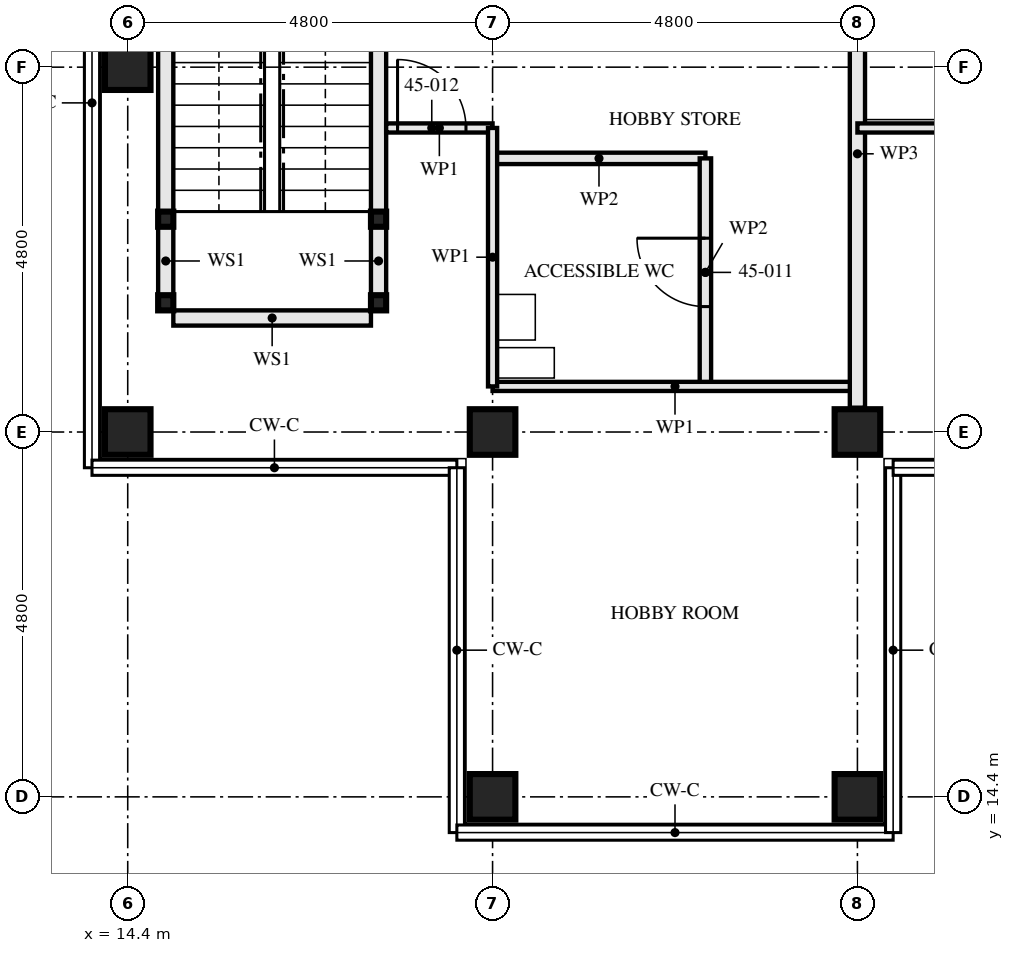
"""IFC4 building model, lengths in metres.
Left out: names, types, materials, properties, quantities, classifications, styles, units other than length and angle.
Written with IfcOpenShell. Run it as: python <this file> out.ifc"""

import sys

from ifc_helpers import new_model, si_unit, direction, frame, frame_2d, origin, origin_2d, place, context, subcontext, project, spatial, rectangle, hollow_rectangle, extrude, element, fill, save


model = new_model("IFC4")
c1 = context("Model", 3, precision=1e-05, world=origin(), true_north=direction((0.0, 1.0)))
c2 = subcontext(c1, "Body", "Model", "MODEL_VIEW")
j1 = project(units=[si_unit("LENGTHUNIT", "METRE"), si_unit("PLANEANGLEUNIT", "RADIAN")], contexts=[c1])
p1 = place(None, origin())
s1 = spatial("IfcSite", under=j1, at=p1, CompositionType="ELEMENT")
p2 = place(p1, origin())
s2 = spatial("IfcBuilding", under=s1, at=p2, CompositionType="ELEMENT")
p3 = place(p2, frame((0.0, 0.0, 165.5)))
s3 = spatial("IfcBuildingStorey", under=s2, at=p3, CompositionType="ELEMENT", Elevation=165.5)
p4 = place(p3, frame((14.4, 19.2, 0.0), z_axis=(0.0, 0.0, 1.0), x_axis=(0.0, 1.0, 0.0)))
e1 = element("IfcColumn", 1, at=p4, inside=s3, PredefinedType="COLUMN", context=c2, shape_type="SweptSolid", body=[
    extrude(hollow_rectangle(XDim=0.6, YDim=0.6, WallThickness=0.06, at=origin_2d()), origin(), (0.0, 0.0, 1.0), 3.5),
])
p5 = place(p3, frame((14.4, 24.0, 0.0), z_axis=(0.0, 0.0, 1.0), x_axis=(1.0, 0.0, 0.0)))
e2 = element("IfcColumn", 2, at=p5, inside=s3, PredefinedType="COLUMN", context=c2, shape_type="SweptSolid", body=[
    extrude(hollow_rectangle(XDim=0.6, YDim=0.6, WallThickness=0.08, at=origin_2d()), origin(), (0.0, 0.0, 1.0), 3.5),
])
for number, where, z_axis, x_axis in (
    (3, (19.2, 14.4, 0.0), (0.0, 0.0, 1.0), (0.0, 1.0, 0.0)),
    (4, (19.2, 19.2, 0.0), (0.0, 0.0, 1.0), (0.0, 1.0, 0.0)),
    (5, (24.0, 14.4, 0.0), (0.0, 0.0, 1.0), (0.0, 1.0, 0.0)),
    (6, (24.0, 19.2, 0.0), (0.0, 0.0, 1.0), (0.0, 1.0, 0.0)),
):
    element("IfcColumn", number, at=place(p3, frame(where, z_axis=z_axis, x_axis=x_axis)), inside=s3, PredefinedType="COLUMN", context=c2, shape_type="SweptSolid", body=[
        extrude(hollow_rectangle(XDim=0.6, YDim=0.6, WallThickness=0.06, at=origin_2d()), origin(), (0.0, 0.0, 1.0), 3.5),
    ])
for number, where, z_axis, x_axis in (
    (7, (14.9, 20.9, 0.0), (0.0, 0.0, 1.0), (1.0, 0.0, 0.0)),
    (8, (17.7, 20.9, 0.0), (0.0, 0.0, 1.0), (1.0, 0.0, 0.0)),
    (9, (14.9, 22.0, 0.0), (0.0, 0.0, 1.0), (1.0, 0.0, 0.0)),
    (10, (17.7, 22.0, 0.0), (0.0, 0.0, 1.0), (1.0, 0.0, 0.0)),
):
    element("IfcColumn", number, at=place(p3, frame(where, z_axis=z_axis, x_axis=x_axis)), inside=s3, PredefinedType="COLUMN", context=c2, shape_type="SweptSolid", body=[
        extrude(hollow_rectangle(XDim=0.2, YDim=0.2, WallThickness=0.008, at=origin_2d()), origin(), (0.0, 0.0, 1.0), 3.33),
    ])
p6 = place(p3, frame((14.9, 21.0, 0.0), z_axis=(0.0, 0.0, 1.0), x_axis=(0.0, 1.0, 0.0)))
e11 = element("IfcWall", 11, at=p6, inside=s3, PredefinedType="SOLIDWALL", context=c2, shape_type="SweptSolid", body=[
    extrude(rectangle(XDim=0.9, YDim=0.2, at=frame_2d((0.45, 0.0))), origin(), (0.0, 0.0, 1.0), 2.99),
])
p7 = place(p3, frame((14.9, 22.1, 0.0), z_axis=(0.0, 0.0, 1.0), x_axis=(0.0, 1.0, 0.0)))
e12 = element("IfcWall", 12, at=p7, inside=s3, PredefinedType="SOLIDWALL", context=c2, shape_type="SweptSolid", body=[
    extrude(rectangle(XDim=4.7, YDim=0.2, at=frame_2d((2.35, 0.0))), origin(), (0.0, 0.0, 1.0), 2.99),
])
p8 = place(p3, frame((17.7, 21.0, 0.0), z_axis=(0.0, 0.0, 1.0), x_axis=(0.0, 1.0, 0.0)))
e13 = element("IfcWall", 13, at=p8, inside=s3, PredefinedType="SOLIDWALL", context=c2, shape_type="SweptSolid", body=[
    extrude(rectangle(XDim=0.9, YDim=0.2, at=frame_2d((0.45, 0.0))), origin(), (0.0, 0.0, 1.0), 2.99),
])
p9 = place(p3, frame((17.7, 22.1, 0.0), z_axis=(0.0, 0.0, 1.0), x_axis=(0.0, 1.0, 0.0)))
e14 = element("IfcWall", 14, at=p9, inside=s3, PredefinedType="SOLIDWALL", context=c2, shape_type="SweptSolid", body=[
    extrude(rectangle(XDim=4.7, YDim=0.2, at=frame_2d((2.35, 0.0))), origin(), (0.0, 0.0, 1.0), 2.99),
])
p10 = place(p3, frame((15.0, 20.7, 0.0), z_axis=(0.0, 0.0, 1.0), x_axis=(1.0, 0.0, 0.0)))
e15 = element("IfcWall", 15, at=p10, inside=s3, PredefinedType="SOLIDWALL", context=c2, shape_type="SweptSolid", body=[
    extrude(rectangle(XDim=2.6, YDim=0.2, at=frame_2d((1.3, 0.0))), origin(), (0.0, 0.0, 1.0), 3.33),
])
p11 = place(p3, frame((22.0, 19.8, 0.0), z_axis=(0.0, 0.0, 1.0), x_axis=(0.0, 1.0, 0.0)))
e16 = element("IfcWall", 16, at=p11, inside=s3, PredefinedType="PARTITIONING", context=c2, shape_type="SweptSolid", body=[
    extrude(rectangle(XDim=3.0, YDim=0.15, at=frame_2d((1.5, 0.0))), origin(), (0.0, 0.0, 1.0), 3.33),
])
p12 = place(p11, frame((1.05, 0.0, 0.0)))
e17 = element("IfcOpeningElement", 17, at=p12, cuts=e16, PredefinedType="OPENING", context=c2, shape_type="SweptSolid", body=[
    extrude(rectangle(XDim=0.9, YDim=2.1, at=frame_2d((0.45, 1.05))), frame((0.0, 0.085, 0.0), z_axis=(0.0, -1.0, 0.0), x_axis=(1.0, 0.0, 0.0)), (0.0, 0.0, 1.0), 0.171),
])
p13 = place(p3, frame((19.2, 22.8, 0.0), z_axis=(0.0, 0.0, 1.0), x_axis=(1.0, 0.0, 0.0)))
e18 = element("IfcWall", 18, at=p13, inside=s3, PredefinedType="PARTITIONING", context=c2, shape_type="SweptSolid", body=[
    extrude(rectangle(XDim=2.8, YDim=0.15, at=frame_2d((1.4, 0.0))), origin(), (0.0, 0.0, 1.0), 3.33),
])
p14 = place(p3, frame((17.8, 23.2, 0.0), z_axis=(0.0, 0.0, 1.0), x_axis=(1.0, 0.0, 0.0)))
e19 = element("IfcWall", 19, at=p14, inside=s3, PredefinedType="PARTITIONING", context=c2, shape_type="SweptSolid", body=[
    extrude(rectangle(XDim=1.4, YDim=0.12, at=frame_2d((0.7, 0.0))), origin(), (0.0, 0.0, 1.0), 3.33),
])
p15 = place(p14, frame((0.15, 0.0, 0.0)))
e20 = element("IfcOpeningElement", 20, at=p15, cuts=e19, PredefinedType="OPENING", context=c2, shape_type="SweptSolid", body=[
    extrude(rectangle(XDim=0.9, YDim=2.1, at=frame_2d((0.45, 1.05))), frame((0.0, 0.071, 0.0), z_axis=(0.0, -1.0, 0.0), x_axis=(1.0, 0.0, 0.0)), (0.0, 0.0, 1.0), 0.141),
])
p16 = place(p3, frame((19.2, 19.8, 0.0), z_axis=(0.0, 0.0, 1.0), x_axis=(1.0, 0.0, 0.0)))
e21 = element("IfcWall", 21, at=p16, inside=s3, PredefinedType="PARTITIONING", context=c2, shape_type="SweptSolid", body=[
    extrude(rectangle(XDim=4.8, YDim=0.12, at=frame_2d((2.4, 0.0))), origin(), (0.0, 0.0, 1.0), 3.33),
])
p17 = place(p3, frame((19.2, 19.8, 0.0), z_axis=(0.0, 0.0, 1.0), x_axis=(0.0, 1.0, 0.0)))
e22 = element("IfcWall", 22, at=p17, inside=s3, PredefinedType="PARTITIONING", context=c2, shape_type="SweptSolid", body=[
    extrude(rectangle(XDim=3.4, YDim=0.12, at=frame_2d((1.7, 0.0))), origin(), (0.0, 0.0, 1.0), 2.55),
])
p18 = place(p3, frame((24.0, 19.52, 0.0), z_axis=(0.0, 0.0, 1.0), x_axis=(0.0, 1.0, 0.0)))
e23 = element("IfcWall", 23, at=p18, inside=s3, PredefinedType="PARTITIONING", context=c2, shape_type="SweptSolid", body=[
    extrude(rectangle(XDim=6.68, YDim=0.2, at=frame_2d((3.34, 0.0))), origin(), (0.0, 0.0, 1.0), 2.55),
])
p19 = place(p3, frame((24.0, 23.2, 0.0), z_axis=(0.0, 0.0, 1.0), x_axis=(1.0, 0.0, 0.0)))
e24 = element("IfcWall", 24, at=p19, inside=s3, PredefinedType="PARTITIONING", context=c2, shape_type="SweptSolid", body=[
    extrude(rectangle(XDim=5.25, YDim=0.12, at=frame_2d((2.625, 0.0))), origin(), (0.0, 0.0, 1.0), 2.32),
])
p20 = place(p19, frame((2.975, 0.0, 0.0)))
e25 = element("IfcOpeningElement", 25, at=p20, cuts=e24, PredefinedType="OPENING", context=c2, shape_type="SweptSolid", body=[
    extrude(rectangle(XDim=0.9, YDim=2.1, at=frame_2d((0.45, 1.05))), frame((0.0, 0.071, 0.0), z_axis=(0.0, -1.0, 0.0), x_axis=(1.0, 0.0, 0.0)), (0.0, 0.0, 1.0), 0.141),
])
p21 = place(p12, origin())
e26 = element("IfcDoor", 26, at=p21, inside=s3, OperationType="SINGLE_SWING_LEFT", PredefinedType="DOOR", context=c2, shape_type="SweptSolid", body=[
    extrude(rectangle(XDim=0.9, YDim=2.1, at=frame_2d((0.45, 1.05))), frame((0.0, 0.022, 0.0), z_axis=(0.0, -1.0, 0.0), x_axis=(1.0, 0.0, 0.0)), (0.0, 0.0, 1.0), 0.044),
])
fill(e17, e26)
p22 = place(p15, origin())
e27 = element("IfcDoor", 27, at=p22, inside=s3, OperationType="SINGLE_SWING_RIGHT", PredefinedType="DOOR", context=c2, shape_type="SweptSolid", body=[
    extrude(rectangle(XDim=0.9, YDim=2.1, at=frame_2d((0.45, 1.05))), frame((0.0, 0.022, 0.0), z_axis=(0.0, -1.0, 0.0), x_axis=(1.0, 0.0, 0.0)), (0.0, 0.0, 1.0), 0.044),
])
fill(e20, e27)
save(model, sys.argv[1])
